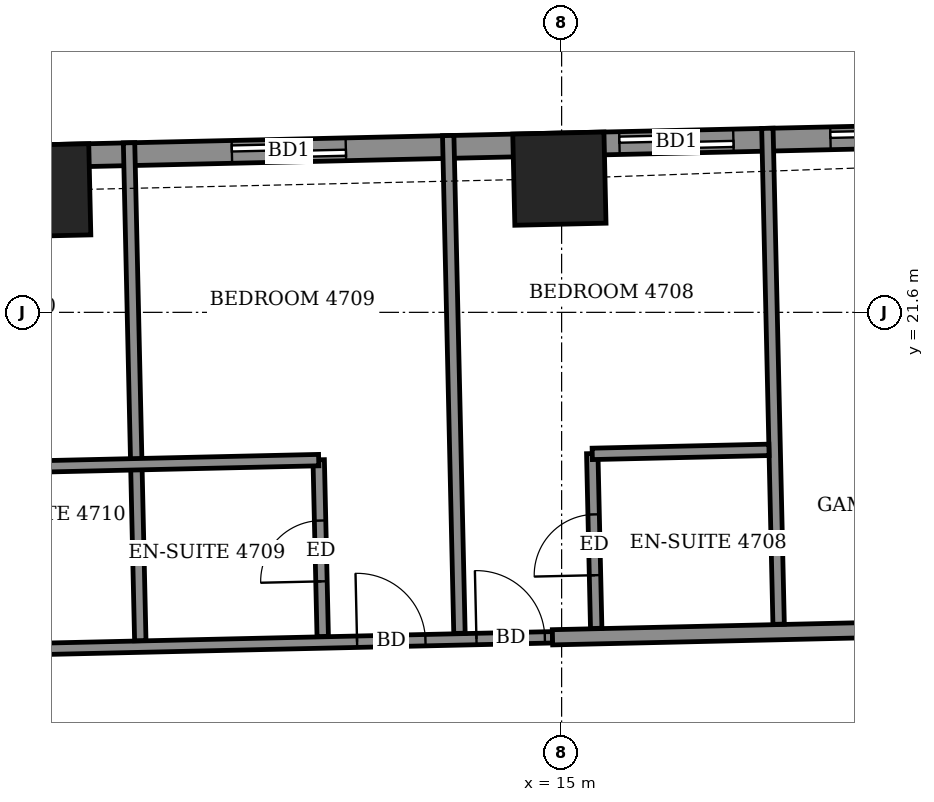
"""IFC4 building model, lengths in metres.
Left out: names, types, materials, properties, quantities, classifications, styles, units other than length and angle.
Written with IfcOpenShell. Run it as: python <this file> out.ifc"""

import sys

from ifc_helpers import new_model, si_unit, direction, frame, frame_2d, origin, origin_2d, place, context, subcontext, project, spatial, rectangle, extrude, element, fill, save


model = new_model("IFC4")
c1 = context("Model", 3, precision=1e-05, world=origin(), true_north=direction((0.0, 1.0)))
c2 = subcontext(c1, "Body", "Model", "MODEL_VIEW")
j1 = project(units=[si_unit("LENGTHUNIT", "METRE"), si_unit("PLANEANGLEUNIT", "RADIAN")], contexts=[c1])
p1 = place(None, origin())
s1 = spatial("IfcSite", under=j1, at=p1, CompositionType="ELEMENT")
p2 = place(p1, origin())
s2 = spatial("IfcBuilding", under=s1, at=p2, CompositionType="ELEMENT")
p3 = place(p2, frame((0.0, 0.0, 186.1)))
s3 = spatial("IfcBuildingStorey", under=s2, at=p3, CompositionType="ELEMENT", Elevation=186.1)
for number, where, z_axis, x_axis in (
    (1, (14.971, 23.359, -0.55), (0.0, 0.0, 1.0), (-1.0, -0.023, 0.0)),
    (2, (8.193, 23.205, -0.55), (0.0, 0.0, 1.0), (-1.0, -0.023, 0.0)),
):
    element("IfcColumn", number, at=place(p3, frame(where, z_axis=z_axis, x_axis=x_axis)), inside=s3, PredefinedType="COLUMN", context=c2, shape_type="SweptSolid", body=[
        extrude(rectangle(XDim=1.2, YDim=1.2, at=origin_2d()), origin(), (0.0, 0.0, 1.0), 3.6),
    ])
p4 = place(p3, frame((21.589, 23.959, 0.0), z_axis=(0.0, 0.0, 1.0), x_axis=(-0.999742671382, -0.022684598702, 0.0)))
e3 = element("IfcWall", 3, at=p4, inside=s3, PredefinedType="SOLIDWALL", context=c2, shape_type="SweptSolid", body=[
    extrude(rectangle(XDim=40.381, YDim=0.3, at=frame_2d((20.19, 0.0))), origin(), (0.0, 0.0, 1.0), 3.05),
])
p5 = place(p4, frame((1.553, 0.0, 0.0)))
e4 = element("IfcOpeningElement", 4, at=p5, cuts=e3, PredefinedType="OPENING", context=c2, shape_type="SweptSolid", body=[
    extrude(rectangle(XDim=1.5, YDim=2.4, at=frame_2d((0.75, 1.2))), frame((0.0, 0.16, 0.0), z_axis=(0.0, -1.0, 0.0), x_axis=(1.0, 0.0, 0.0)), (0.0, 0.0, 1.0), 0.32),
])
p6 = place(p4, frame((4.33, 0.0, 0.0)))
e5 = element("IfcOpeningElement", 5, at=p6, cuts=e3, PredefinedType="OPENING", context=c2, shape_type="SweptSolid", body=[
    extrude(rectangle(XDim=1.5, YDim=2.4, at=frame_2d((0.75, 1.2))), frame((0.0, 0.16, 0.0), z_axis=(0.0, -1.0, 0.0), x_axis=(1.0, 0.0, 0.0)), (0.0, 0.0, 1.0), 0.32),
])
p7 = place(p4, frame((9.43, 0.0, 0.0)))
e6 = element("IfcOpeningElement", 6, at=p7, cuts=e3, PredefinedType="OPENING", context=c2, shape_type="SweptSolid", body=[
    extrude(rectangle(XDim=1.5, YDim=2.4, at=frame_2d((0.75, 1.2))), frame((0.0, 0.16, 0.0), z_axis=(0.0, -1.0, 0.0), x_axis=(1.0, 0.0, 0.0)), (0.0, 0.0, 1.0), 0.32),
])
p8 = place(p4, frame((14.37, 0.0, 0.0)))
e7 = element("IfcOpeningElement", 7, at=p8, cuts=e3, PredefinedType="OPENING", context=c2, shape_type="SweptSolid", body=[
    extrude(rectangle(XDim=1.5, YDim=2.4, at=frame_2d((0.75, 1.2))), frame((0.0, 0.16, 0.0), z_axis=(0.0, -1.0, 0.0), x_axis=(1.0, 0.0, 0.0)), (0.0, 0.0, 1.0), 0.32),
])
p9 = place(p4, frame((17.41, 0.0, 0.0)))
e8 = element("IfcOpeningElement", 8, at=p9, cuts=e3, PredefinedType="OPENING", context=c2, shape_type="SweptSolid", body=[
    extrude(rectangle(XDim=1.5, YDim=2.4, at=frame_2d((0.75, 1.2))), frame((0.0, 0.16, 0.0), z_axis=(0.0, -1.0, 0.0), x_axis=(1.0, 0.0, 0.0)), (0.0, 0.0, 1.0), 0.32),
])
p10 = place(p4, frame((22.03, 0.0, 0.0)))
e9 = element("IfcOpeningElement", 9, at=p10, cuts=e3, PredefinedType="OPENING", context=c2, shape_type="SweptSolid", body=[
    extrude(rectangle(XDim=1.5, YDim=2.4, at=frame_2d((0.75, 1.2))), frame((0.0, 0.16, 0.0), z_axis=(0.0, -1.0, 0.0), x_axis=(1.0, 0.0, 0.0)), (0.0, 0.0, 1.0), 0.32),
])
p11 = place(p4, frame((27.7, 0.0, 0.0)))
e10 = element("IfcOpeningElement", 10, at=p11, cuts=e3, PredefinedType="OPENING", context=c2, shape_type="SweptSolid", body=[
    extrude(rectangle(XDim=1.2, YDim=2.4, at=frame_2d((0.6, 1.2))), frame((0.0, 0.16, 0.0), z_axis=(0.0, -1.0, 0.0), x_axis=(1.0, 0.0, 0.0)), (0.0, 0.0, 1.0), 0.32),
])
p12 = place(p4, frame((30.48, 0.0, 0.0)))
e11 = element("IfcOpeningElement", 11, at=p12, cuts=e3, PredefinedType="OPENING", context=c2, shape_type="SweptSolid", body=[
    extrude(rectangle(XDim=1.5, YDim=2.4, at=frame_2d((0.75, 1.2))), frame((0.0, 0.16, 0.0), z_axis=(0.0, -1.0, 0.0), x_axis=(1.0, 0.0, 0.0)), (0.0, 0.0, 1.0), 0.32),
])
p13 = place(p4, frame((35.065, 0.0, 0.0)))
e12 = element("IfcOpeningElement", 12, at=p13, cuts=e3, PredefinedType="OPENING", context=c2, shape_type="SweptSolid", body=[
    extrude(rectangle(XDim=1.5, YDim=2.4, at=frame_2d((0.75, 1.2))), frame((0.0, 0.16, 0.0), z_axis=(0.0, -1.0, 0.0), x_axis=(1.0, 0.0, 0.0)), (0.0, 0.0, 1.0), 0.32),
])
p14 = place(p4, frame((37.945, 0.0, 0.9)))
e13 = element("IfcOpeningElement", 13, at=p14, cuts=e3, PredefinedType="OPENING", context=c2, shape_type="SweptSolid", body=[
    extrude(rectangle(XDim=1.2, YDim=1.5, at=frame_2d((0.6, 0.75))), frame((0.0, 0.16, 0.0), z_axis=(0.0, -1.0, 0.0), x_axis=(1.0, 0.0, 0.0)), (0.0, 0.0, 1.0), 0.32),
])
p15 = place(p3, frame((-15.649, 16.633, 0.0), z_axis=(0.0, 0.0, 1.0), x_axis=(0.999743261737, 0.022658565952, 0.0)))
e14 = element("IfcWall", 14, at=p15, inside=s3, PredefinedType="PARTITIONING", context=c2, shape_type="SweptSolid", body=[
    extrude(rectangle(XDim=30.536, YDim=0.15, at=frame_2d((15.268, 0.0))), origin(), (0.0, 0.0, 1.0), 3.05),
])
p16 = place(p15, frame((29.536, 0.0, 0.0)))
e15 = element("IfcOpeningElement", 15, at=p16, cuts=e14, PredefinedType="OPENING", context=c2, shape_type="SweptSolid", body=[
    extrude(rectangle(XDim=0.9, YDim=2.1, at=frame_2d((0.45, 1.05))), frame((0.0, 0.085, 0.0), z_axis=(0.0, -1.0, 0.0), x_axis=(1.0, 0.0, 0.0)), (0.0, 0.0, 1.0), 0.17),
])
p17 = place(p15, frame((27.965, 0.0, 0.0)))
e16 = element("IfcOpeningElement", 16, at=p17, cuts=e14, PredefinedType="OPENING", context=c2, shape_type="SweptSolid", body=[
    extrude(rectangle(XDim=0.9, YDim=2.1, at=frame_2d((0.45, 1.05))), frame((0.0, 0.085, 0.0), z_axis=(0.0, -1.0, 0.0), x_axis=(1.0, 0.0, 0.0)), (0.0, 0.0, 1.0), 0.17),
])
p18 = place(p15, frame((21.365, 0.0, 0.0)))
e17 = element("IfcOpeningElement", 17, at=p18, cuts=e14, PredefinedType="OPENING", context=c2, shape_type="SweptSolid", body=[
    extrude(rectangle(XDim=0.9, YDim=2.1, at=frame_2d((0.45, 1.05))), frame((0.0, 0.085, 0.0), z_axis=(0.0, -1.0, 0.0), x_axis=(1.0, 0.0, 0.0)), (0.0, 0.0, 1.0), 0.17),
])
p19 = place(p15, frame((19.565, 0.0, 0.0)))
e18 = element("IfcOpeningElement", 18, at=p19, cuts=e14, PredefinedType="OPENING", context=c2, shape_type="SweptSolid", body=[
    extrude(rectangle(XDim=0.9, YDim=2.1, at=frame_2d((0.45, 1.05))), frame((0.0, 0.085, 0.0), z_axis=(0.0, -1.0, 0.0), x_axis=(1.0, 0.0, 0.0)), (0.0, 0.0, 1.0), 0.17),
])
p20 = place(p15, frame((12.965, 0.0, 0.0)))
e19 = element("IfcOpeningElement", 19, at=p20, cuts=e14, PredefinedType="OPENING", context=c2, shape_type="SweptSolid", body=[
    extrude(rectangle(XDim=0.9, YDim=2.1, at=frame_2d((0.45, 1.05))), frame((0.0, 0.085, 0.0), z_axis=(0.0, -1.0, 0.0), x_axis=(1.0, 0.0, 0.0)), (0.0, 0.0, 1.0), 0.17),
])
p21 = place(p15, frame((11.14, 0.0, 0.0)))
e20 = element("IfcOpeningElement", 20, at=p21, cuts=e14, PredefinedType="OPENING", context=c2, shape_type="SweptSolid", body=[
    extrude(rectangle(XDim=0.9, YDim=2.1, at=frame_2d((0.45, 1.05))), frame((0.0, 0.085, 0.0), z_axis=(0.0, -1.0, 0.0), x_axis=(1.0, 0.0, 0.0)), (0.0, 0.0, 1.0), 0.17),
])
p22 = place(p15, frame((4.515, 0.0, 0.0)))
e21 = element("IfcOpeningElement", 21, at=p22, cuts=e14, PredefinedType="OPENING", context=c2, shape_type="SweptSolid", body=[
    extrude(rectangle(XDim=0.9, YDim=2.1, at=frame_2d((0.45, 1.05))), frame((0.0, 0.085, 0.0), z_axis=(0.0, -1.0, 0.0), x_axis=(1.0, 0.0, 0.0)), (0.0, 0.0, 1.0), 0.17),
])
p23 = place(p15, frame((2.715, 0.0, 0.0)))
e22 = element("IfcOpeningElement", 22, at=p23, cuts=e14, PredefinedType="OPENING", context=c2, shape_type="SweptSolid", body=[
    extrude(rectangle(XDim=0.9, YDim=2.1, at=frame_2d((0.45, 1.05))), frame((0.0, 0.085, 0.0), z_axis=(0.0, -1.0, 0.0), x_axis=(1.0, 0.0, 0.0)), (0.0, 0.0, 1.0), 0.17),
])
p24 = place(p3, frame((14.88, 17.325, 0.0), z_axis=(0.0, 0.0, 1.0), x_axis=(0.999742504166, 0.022691966963, 0.0)))
e23 = element("IfcWall", 23, at=p24, inside=s3, PredefinedType="PARTITIONING", context=c2, shape_type="SweptSolid", body=[
    extrude(rectangle(XDim=9.608, YDim=0.2, at=frame_2d((4.804, 0.0))), origin(), (0.0, 0.0, 1.0), 3.05),
])
p25 = place(p24, frame((5.85, 0.0, 0.0)))
e24 = element("IfcOpeningElement", 24, at=p25, cuts=e23, PredefinedType="OPENING", context=c2, shape_type="SweptSolid", body=[
    extrude(rectangle(XDim=1.0, YDim=2.1, at=frame_2d((0.5, 1.05))), frame((0.0, 0.11, 0.0), z_axis=(0.0, -1.0, 0.0), x_axis=(1.0, 0.0, 0.0)), (0.0, 0.0, 1.0), 0.22),
])
p26 = place(p3, frame((9.457, 17.281, 0.0), z_axis=(0.0, 0.0, 1.0), x_axis=(-0.022581738791, 0.999745000024, 0.0)))
e25 = element("IfcWall", 25, at=p26, inside=s3, PredefinedType="PARTITIONING", context=c2, shape_type="SweptSolid", body=[
    extrude(rectangle(XDim=6.552, YDim=0.15, at=frame_2d((3.276, 0.0))), origin(), (0.0, 0.0, 1.0), 2.55),
])
p27 = place(p3, frame((11.857, 17.336, 0.0), z_axis=(0.0, 0.0, 1.0), x_axis=(-0.02279059109, 0.999740260747, 0.0)))
e26 = element("IfcWall", 26, at=p27, inside=s3, PredefinedType="PARTITIONING", context=c2, shape_type="SweptSolid", body=[
    extrude(rectangle(XDim=2.324, YDim=0.15, at=frame_2d((1.162, 0.0))), origin(), (0.0, 0.0, 1.0), 3.05),
])
p28 = place(p27, frame((0.725, 0.0, 0.0)))
e27 = element("IfcOpeningElement", 27, at=p28, cuts=e26, PredefinedType="OPENING", context=c2, shape_type="SweptSolid", body=[
    extrude(rectangle(XDim=0.8, YDim=2.1, at=frame_2d((0.4, 1.05))), frame((0.0, 0.085, 0.0), z_axis=(0.0, -1.0, 0.0), x_axis=(1.0, 0.0, 0.0)), (0.0, 0.0, 1.0), 0.17),
])
p29 = place(p3, frame((13.656, 17.377, 0.0), z_axis=(0.0, 0.0, 1.0), x_axis=(-0.022585104341, 0.999744923999, 0.0)))
e28 = element("IfcWall", 28, at=p29, inside=s3, PredefinedType="PARTITIONING", context=c2, shape_type="SweptSolid", body=[
    extrude(rectangle(XDim=6.551, YDim=0.15, at=frame_2d((3.275, 0.0))), origin(), (0.0, 0.0, 1.0), 2.55),
])
p30 = place(p3, frame((15.455, 17.442, 0.0), z_axis=(0.0, 0.0, 1.0), x_axis=(-0.022603288534, 0.999744513037, 0.0)))
e29 = element("IfcWall", 29, at=p30, inside=s3, PredefinedType="PARTITIONING", context=c2, shape_type="SweptSolid", body=[
    extrude(rectangle(XDim=2.301, YDim=0.15, at=frame_2d((1.15, 0.0))), origin(), (0.0, 0.0, 1.0), 3.05),
])
p31 = place(p30, frame((0.7, 0.0, 0.0)))
e30 = element("IfcOpeningElement", 30, at=p31, cuts=e29, PredefinedType="OPENING", context=c2, shape_type="SweptSolid", body=[
    extrude(rectangle(XDim=0.8, YDim=2.1, at=frame_2d((0.4, 1.05))), frame((0.0, 0.085, 0.0), z_axis=(0.0, -1.0, 0.0), x_axis=(1.0, 0.0, 0.0)), (0.0, 0.0, 1.0), 0.17),
])
p32 = place(p3, frame((17.855, 17.497, 0.0), z_axis=(0.0, 0.0, 1.0), x_axis=(-0.022672114006, 0.999742954587, 0.0)))
e31 = element("IfcWall", 31, at=p32, inside=s3, PredefinedType="PARTITIONING", context=c2, shape_type="SweptSolid", body=[
    extrude(rectangle(XDim=6.526, YDim=0.15, at=frame_2d((3.263, 0.0))), origin(), (0.0, 0.0, 1.0), 2.55),
])
p33 = place(p3, frame((7.005, 19.547, 0.0), z_axis=(0.0, 0.0, 1.0), x_axis=(0.999742701292, 0.022683280499, 0.0)))
e32 = element("IfcWall", 32, at=p33, inside=s3, PredefinedType="PARTITIONING", context=c2, shape_type="SweptSolid", body=[
    extrude(rectangle(XDim=4.8, YDim=0.15, at=frame_2d((2.4, 0.0))), origin(), (0.0, 0.0, 1.0), 3.05),
])
p34 = place(p3, frame((15.403, 19.738, 0.0), z_axis=(0.0, 0.0, 1.0), x_axis=(0.999740478815, 0.022781023197, 0.0)))
e33 = element("IfcWall", 33, at=p34, inside=s3, PredefinedType="PARTITIONING", context=c2, shape_type="SweptSolid", body=[
    extrude(rectangle(XDim=2.325, YDim=0.15, at=frame_2d((1.163, 0.0))), origin(), (0.0, 0.0, 1.0), 3.05),
])
p35 = place(p5, origin())
e34 = element("IfcDoor", 34, at=p35, inside=s3, OperationType="SLIDING_TO_LEFT", PredefinedType="DOOR", context=c2, shape_type="SweptSolid", body=[
    extrude(rectangle(XDim=1.5, YDim=2.4, at=frame_2d((0.75, 1.2))), frame((0.0, 0.025, 0.0), z_axis=(0.0, -1.0, 0.0), x_axis=(1.0, 0.0, 0.0)), (0.0, 0.0, 1.0), 0.05),
])
fill(e4, e34)
p36 = place(p6, origin())
e35 = element("IfcDoor", 35, at=p36, inside=s3, OperationType="SLIDING_TO_LEFT", PredefinedType="DOOR", context=c2, shape_type="SweptSolid", body=[
    extrude(rectangle(XDim=1.5, YDim=2.4, at=frame_2d((0.75, 1.2))), frame((0.0, 0.025, 0.0), z_axis=(0.0, -1.0, 0.0), x_axis=(1.0, 0.0, 0.0)), (0.0, 0.0, 1.0), 0.05),
])
fill(e5, e35)
p37 = place(p7, origin())
e36 = element("IfcDoor", 36, at=p37, inside=s3, OperationType="SLIDING_TO_LEFT", PredefinedType="DOOR", context=c2, shape_type="SweptSolid", body=[
    extrude(rectangle(XDim=1.5, YDim=2.4, at=frame_2d((0.75, 1.2))), frame((0.0, 0.025, 0.0), z_axis=(0.0, -1.0, 0.0), x_axis=(1.0, 0.0, 0.0)), (0.0, 0.0, 1.0), 0.05),
])
fill(e6, e36)
p38 = place(p16, origin())
e37 = element("IfcDoor", 37, at=p38, inside=s3, OperationType="SINGLE_SWING_RIGHT", PredefinedType="DOOR", context=c2, shape_type="SweptSolid", body=[
    extrude(rectangle(XDim=0.9, YDim=2.1, at=frame_2d((0.45, 1.05))), frame((0.0, 0.025, 0.0), z_axis=(0.0, -1.0, 0.0), x_axis=(1.0, 0.0, 0.0)), (0.0, 0.0, 1.0), 0.05),
])
fill(e15, e37)
p39 = place(p31, origin())
e38 = element("IfcDoor", 38, at=p39, inside=s3, OperationType="SINGLE_SWING_RIGHT", PredefinedType="DOOR", context=c2, shape_type="SweptSolid", body=[
    extrude(rectangle(XDim=0.8, YDim=2.1, at=frame_2d((0.4, 1.05))), frame((0.0, 0.025, 0.0), z_axis=(0.0, -1.0, 0.0), x_axis=(1.0, 0.0, 0.0)), (0.0, 0.0, 1.0), 0.05),
])
fill(e30, e38)
p40 = place(p17, origin())
e39 = element("IfcDoor", 39, at=p40, inside=s3, OperationType="SINGLE_SWING_LEFT", PredefinedType="DOOR", context=c2, shape_type="SweptSolid", body=[
    extrude(rectangle(XDim=0.9, YDim=2.1, at=frame_2d((0.45, 1.05))), frame((0.0, 0.025, 0.0), z_axis=(0.0, -1.0, 0.0), x_axis=(1.0, 0.0, 0.0)), (0.0, 0.0, 1.0), 0.05),
])
fill(e16, e39)
p41 = place(p28, origin())
e40 = element("IfcDoor", 40, at=p41, inside=s3, OperationType="SINGLE_SWING_LEFT", PredefinedType="DOOR", context=c2, shape_type="SweptSolid", body=[
    extrude(rectangle(XDim=0.8, YDim=2.1, at=frame_2d((0.4, 1.05))), frame((0.0, 0.025, 0.0), z_axis=(0.0, -1.0, 0.0), x_axis=(1.0, 0.0, 0.0)), (0.0, 0.0, 1.0), 0.05),
])
fill(e27, e40)
save(model, sys.argv[1])
